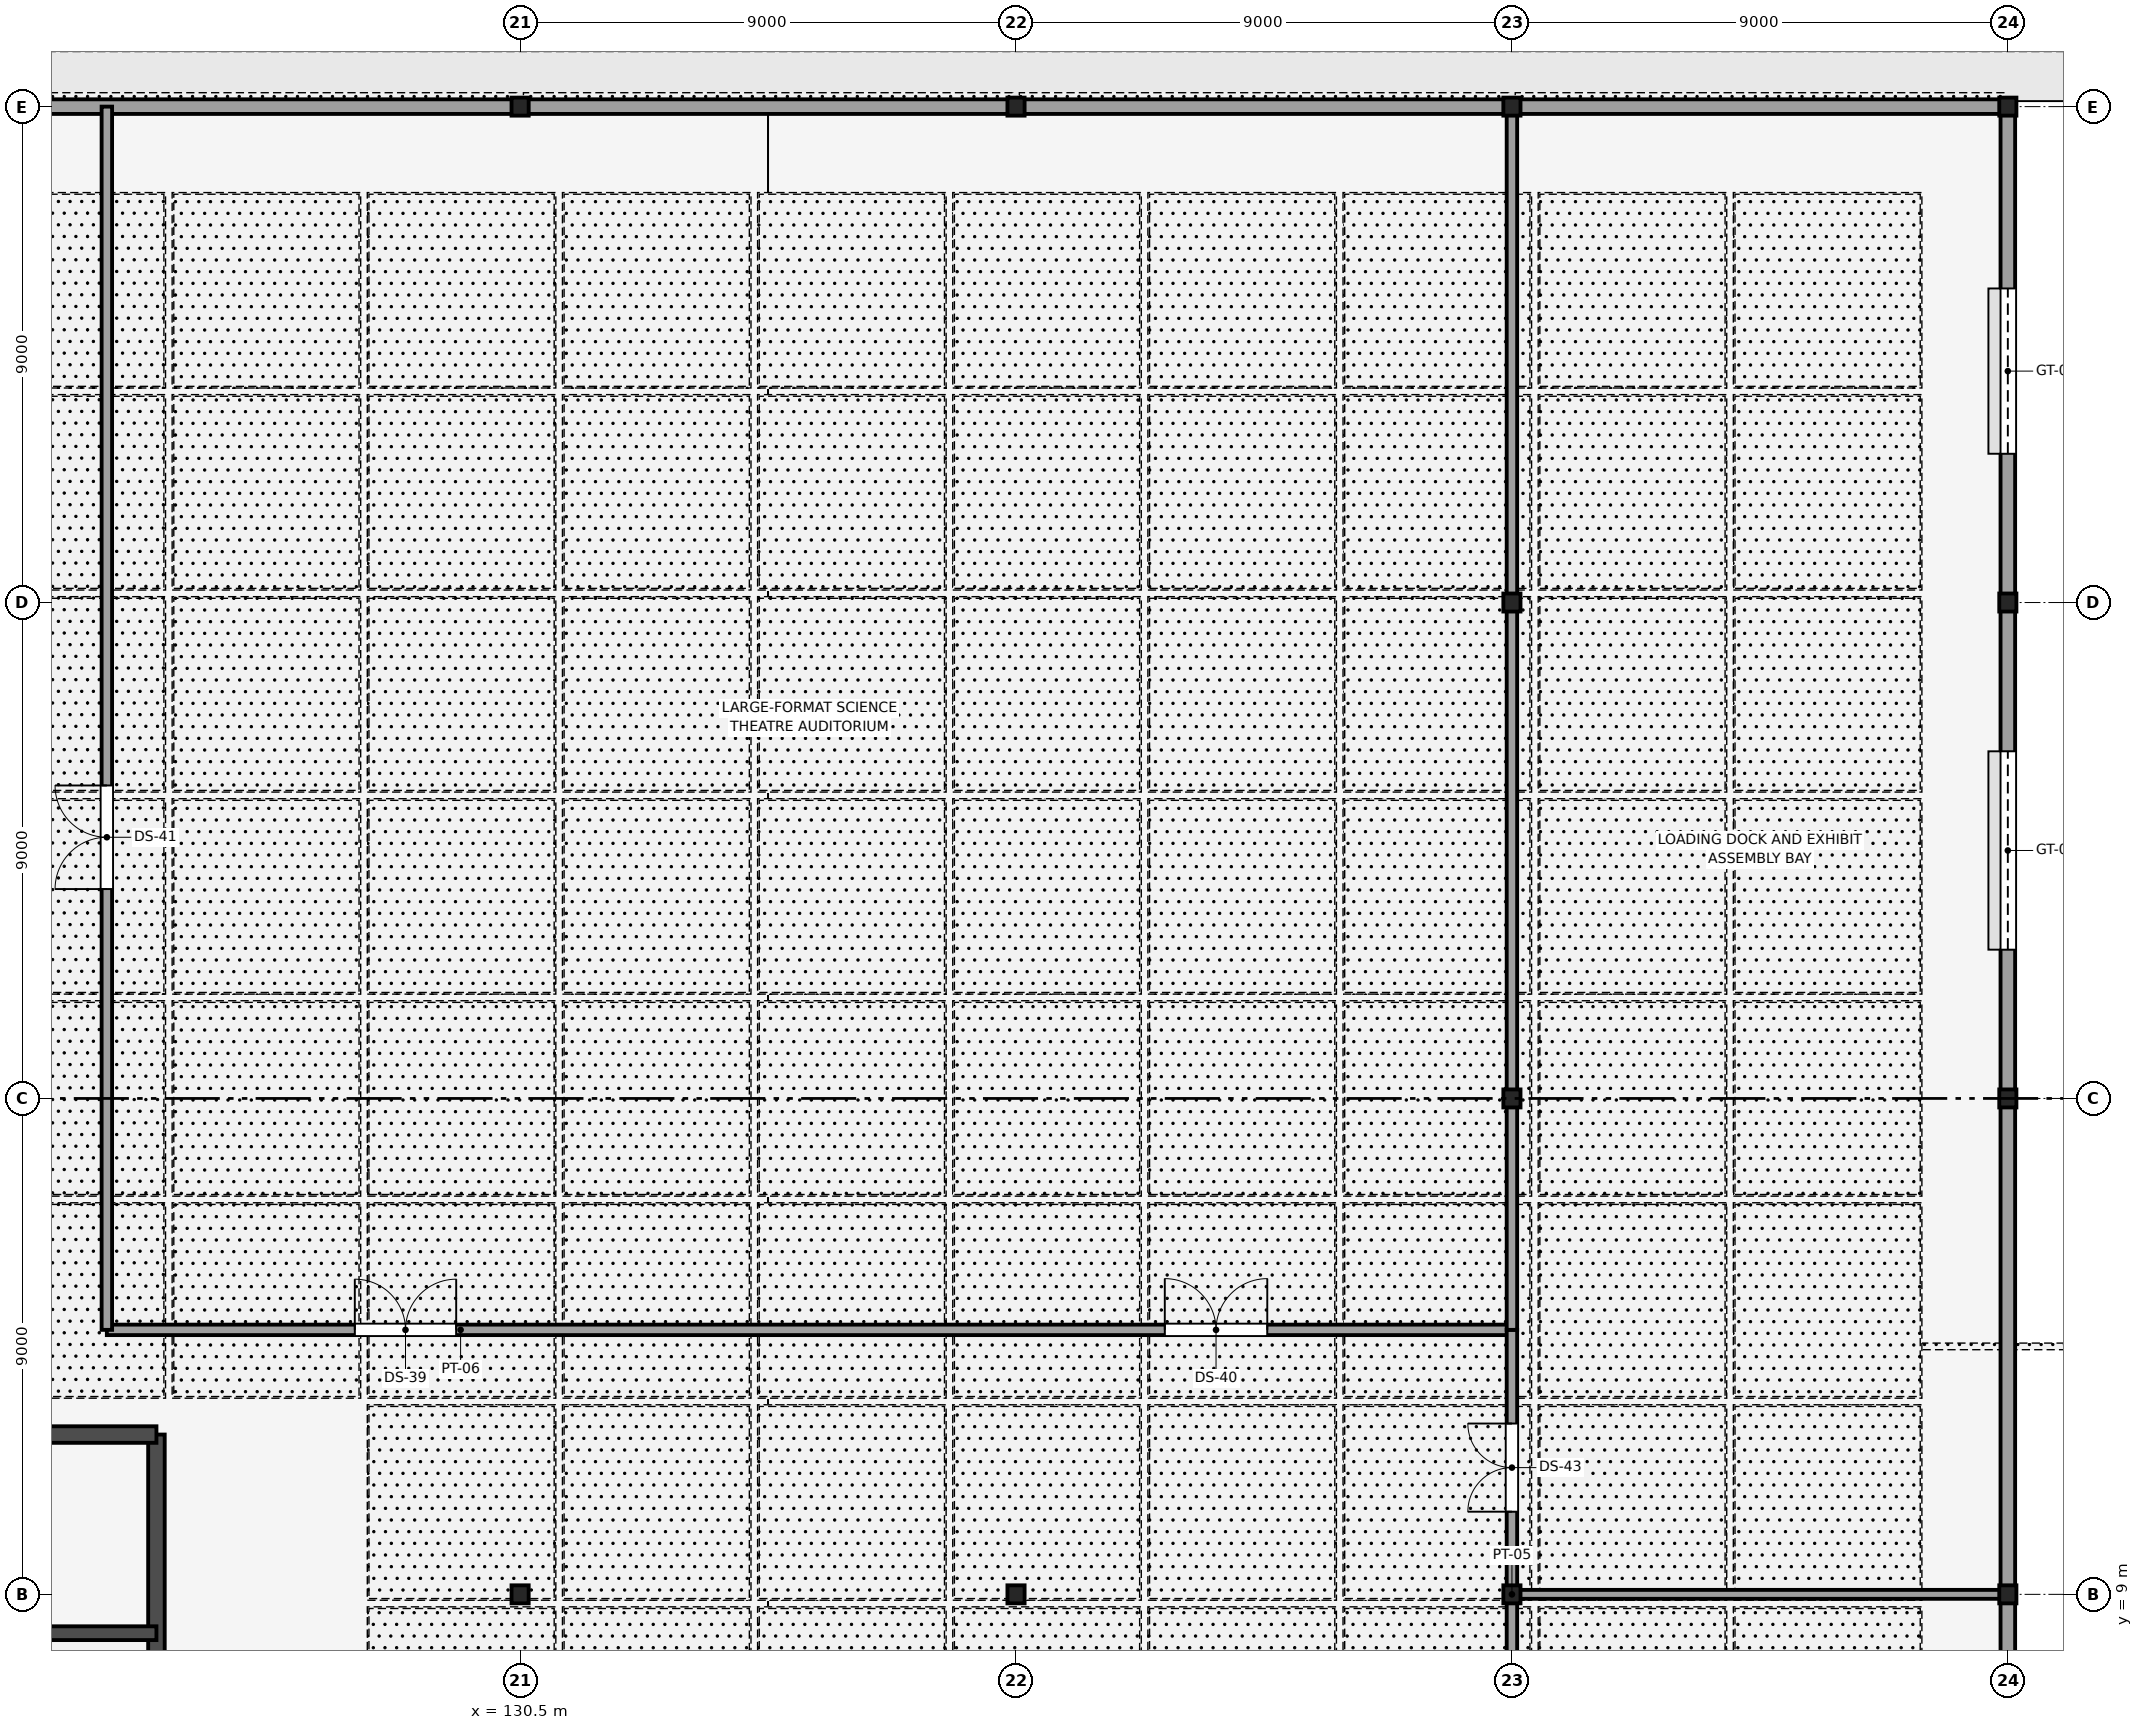
"""IFC4 building model, lengths in metres.
Left out: names, types, materials, properties, quantities, classifications, styles, units other than length and angle.
Written with IfcOpenShell. Run it as: python <this file> out.ifc"""

import sys

from ifc_helpers import new_model, si_unit, direction, frame, frame_2d, origin, origin_2d, place, context, subcontext, project, spatial, rectangle, i_section, extrude, element, fill, save


model = new_model("IFC4")
c1 = context("Model", 3, precision=1e-05, world=origin(), true_north=direction((0.0, 1.0)))
c2 = subcontext(c1, "Body", "Model", "MODEL_VIEW")
j1 = project(units=[si_unit("LENGTHUNIT", "METRE"), si_unit("PLANEANGLEUNIT", "RADIAN")], contexts=[c1])
p1 = place(None, origin())
s1 = spatial("IfcSite", under=j1, at=p1, CompositionType="ELEMENT")
p2 = place(p1, origin())
s2 = spatial("IfcBuilding", under=s1, at=p2, CompositionType="ELEMENT")
p3 = place(p2, origin())
s3 = spatial("IfcBuildingStorey", under=s2, at=p3, CompositionType="ELEMENT", Elevation=0.0)
for number, where, z_axis, x_axis in (
    (1, (130.5, 9.0, -0.24), (0.0, 0.0, 1.0), (1.0, 0.0, 0.0)),
    (2, (130.5, 36.0, -0.24), (0.0, 0.0, 1.0), (1.0, 0.0, 0.0)),
    (3, (139.5, 9.0, -0.24), (0.0, 0.0, 1.0), (1.0, 0.0, 0.0)),
    (4, (139.5, 36.0, -0.24), (0.0, 0.0, 1.0), (1.0, 0.0, 0.0)),
    (5, (148.5, 9.0, -0.24), (0.0, 0.0, 1.0), (1.0, 0.0, 0.0)),
    (6, (148.5, 18.0, -0.24), (0.0, 0.0, 1.0), (1.0, 0.0, 0.0)),
    (7, (148.5, 27.0, -0.24), (0.0, 0.0, 1.0), (1.0, 0.0, 0.0)),
    (8, (148.5, 36.0, -0.24), (0.0, 0.0, 1.0), (1.0, 0.0, 0.0)),
    (9, (157.5, 9.0, -0.24), (0.0, 0.0, 1.0), (1.0, 0.0, 0.0)),
    (10, (157.5, 18.0, -0.24), (0.0, 0.0, 1.0), (1.0, 0.0, 0.0)),
    (11, (157.5, 27.0, -0.24), (0.0, 0.0, 1.0), (1.0, 0.0, 0.0)),
    (12, (157.5, 36.0, -0.24), (0.0, 0.0, 1.0), (1.0, 0.0, 0.0)),
):
    element("IfcColumn", number, at=place(p3, frame(where, z_axis=z_axis, x_axis=x_axis)), inside=s3, PredefinedType="COLUMN", context=c2, shape_type="SweptSolid", body=[
        extrude(i_section(OverallWidth=0.311, OverallDepth=0.327, WebThickness=0.016, FlangeThickness=0.025, FilletRadius=0.017, at=origin_2d()), origin(), (0.0, 0.0, 1.0), 5.64),
    ])
p4 = place(p3, frame((123.9, 4.3, -0.24), z_axis=(0.0, 0.0, 1.0), x_axis=(0.0, 1.0, 0.0)))
e13 = element("IfcWall", 13, at=p4, inside=s3, PredefinedType="SHEAR", context=c2, shape_type="SweptSolid", body=[
    extrude(rectangle(XDim=7.6, YDim=0.3, at=frame_2d((3.8, 0.0))), origin(), (0.0, 0.0, 1.0), 5.64),
])
p5 = place(p3, frame((116.3, 11.9, -0.24), z_axis=(0.0, 0.0, 1.0), x_axis=(1.0, 0.0, 0.0)))
e14 = element("IfcWall", 14, at=p5, inside=s3, PredefinedType="SHEAR", context=c2, shape_type="SweptSolid", body=[
    extrude(rectangle(XDim=7.6, YDim=0.3, at=frame_2d((3.8, 0.0))), origin(), (0.0, 0.0, 1.0), 5.64),
])
p6 = place(p5, frame((2.7, 0.0, 0.24)))
e15 = element("IfcOpeningElement", 15, at=p6, cuts=e14, PredefinedType="OPENING", context=c2, shape_type="SweptSolid", body=[
    extrude(rectangle(XDim=1.1, YDim=2.2, at=frame_2d((0.55, 1.1))), frame((0.0, 0.16, 0.0), z_axis=(0.0, -1.0, 0.0), x_axis=(1.0, 0.0, 0.0)), (0.0, 0.0, 1.0), 0.32),
])
p7 = place(p3, frame((116.3, 8.295, -0.24), z_axis=(0.0, 0.0, 1.0), x_axis=(1.0, 0.0, 0.0)))
e16 = element("IfcWall", 16, at=p7, inside=s3, PredefinedType="SHEAR", context=c2, shape_type="SweptSolid", body=[
    extrude(rectangle(XDim=7.6, YDim=0.25, at=frame_2d((3.8, 0.0))), origin(), (0.0, 0.0, 1.0), 5.64),
])
for number, where, z_axis, x_axis in (
    (17, (130.5, 36.0, 0.0), (0.0, 0.0, 1.0), (-1.0, 0.0, 0.0)),
    (18, (139.5, 36.0, 0.0), (0.0, 0.0, 1.0), (-1.0, 0.0, 0.0)),
    (19, (148.5, 36.0, 0.0), (0.0, 0.0, 1.0), (-1.0, 0.0, 0.0)),
    (20, (157.5, 36.0, 0.0), (0.0, 0.0, 1.0), (-1.0, 0.0, 0.0)),
    (21, (157.5, 0.0, 0.0), (0.0, 0.0, 1.0), (0.0, 1.0, 0.0)),
    (22, (157.5, 9.0, 0.0), (0.0, 0.0, 1.0), (0.0, 1.0, 0.0)),
):
    element("IfcWall", number, at=place(p3, frame(where, z_axis=z_axis, x_axis=x_axis)), inside=s3, PredefinedType="STANDARD", context=c2, shape_type="SweptSolid", body=[
        extrude(rectangle(XDim=9.0, YDim=0.265, at=frame_2d((4.5, 0.0))), origin(), (0.0, 0.0, 1.0), 4.681),
    ])
p8 = place(p3, frame((157.5, 18.0, 0.0), z_axis=(0.0, 0.0, 1.0), x_axis=(0.0, 1.0, 0.0)))
e23 = element("IfcWall", 23, at=p8, inside=s3, PredefinedType="STANDARD", context=c2, shape_type="SweptSolid", body=[
    extrude(rectangle(XDim=9.0, YDim=0.265, at=frame_2d((4.5, 0.0))), origin(), (0.0, 0.0, 1.0), 4.681),
])
p9 = place(p8, frame((2.7, 0.0, 0.0)))
e24 = element("IfcOpeningElement", 24, at=p9, cuts=e23, PredefinedType="OPENING", context=c2, shape_type="SweptSolid", body=[
    extrude(rectangle(XDim=3.6, YDim=3.8, at=frame_2d((1.8, 1.9))), frame((0.0, 0.143, 0.0), z_axis=(0.0, -1.0, 0.0), x_axis=(1.0, 0.0, 0.0)), (0.0, 0.0, 1.0), 0.285),
])
p10 = place(p3, frame((157.5, 27.0, 0.0), z_axis=(0.0, 0.0, 1.0), x_axis=(0.0, 1.0, 0.0)))
e25 = element("IfcWall", 25, at=p10, inside=s3, PredefinedType="STANDARD", context=c2, shape_type="SweptSolid", body=[
    extrude(rectangle(XDim=9.0, YDim=0.265, at=frame_2d((4.5, 0.0))), origin(), (0.0, 0.0, 1.0), 4.681),
])
p11 = place(p10, frame((2.7, 0.0, 0.0)))
e26 = element("IfcOpeningElement", 26, at=p11, cuts=e25, PredefinedType="OPENING", context=c2, shape_type="SweptSolid", body=[
    extrude(rectangle(XDim=3.0, YDim=3.2, at=frame_2d((1.5, 1.6))), frame((0.0, 0.143, 0.0), z_axis=(0.0, -1.0, 0.0), x_axis=(1.0, 0.0, 0.0)), (0.0, 0.0, 1.0), 0.285),
])
p12 = place(p3, frame((123.0, 13.8, 0.0), z_axis=(0.0, 0.0, 1.0), x_axis=(1.0, 0.0, 0.0)))
e27 = element("IfcWall", 27, at=p12, inside=s3, PredefinedType="PARTITIONING", context=c2, shape_type="SweptSolid", body=[
    extrude(rectangle(XDim=25.5, YDim=0.19, at=frame_2d((12.75, 0.0))), origin(), (0.0, 0.0, 1.0), 5.22),
])
p13 = place(p12, frame((4.5, 0.0, 0.0)))
e28 = element("IfcOpeningElement", 28, at=p13, cuts=e27, PredefinedType="OPENING", context=c2, shape_type="SweptSolid", body=[
    extrude(rectangle(XDim=1.84, YDim=2.4, at=frame_2d((0.92, 1.2))), frame((0.0, 0.105, 0.0), z_axis=(0.0, -1.0, 0.0), x_axis=(1.0, 0.0, 0.0)), (0.0, 0.0, 1.0), 0.21),
])
p14 = place(p12, frame((19.2, 0.0, 0.0)))
e29 = element("IfcOpeningElement", 29, at=p14, cuts=e27, PredefinedType="OPENING", context=c2, shape_type="SweptSolid", body=[
    extrude(rectangle(XDim=1.86, YDim=2.4, at=frame_2d((0.93, 1.2))), frame((0.0, 0.105, 0.0), z_axis=(0.0, -1.0, 0.0), x_axis=(1.0, 0.0, 0.0)), (0.0, 0.0, 1.0), 0.21),
])
p15 = place(p3, frame((123.0, 13.8, 0.0), z_axis=(0.0, 0.0, 1.0), x_axis=(0.0, 1.0, 0.0)))
e30 = element("IfcWall", 30, at=p15, inside=s3, PredefinedType="PARTITIONING", context=c2, shape_type="SweptSolid", body=[
    extrude(rectangle(XDim=22.2, YDim=0.19, at=frame_2d((11.1, 0.0))), origin(), (0.0, 0.0, 1.0), 5.22),
])
p16 = place(p15, frame((8.0, 0.0, 0.0)))
e31 = element("IfcOpeningElement", 31, at=p16, cuts=e30, PredefinedType="OPENING", context=c2, shape_type="SweptSolid", body=[
    extrude(rectangle(XDim=1.88, YDim=2.4, at=frame_2d((0.94, 1.2))), frame((0.0, 0.105, 0.0), z_axis=(0.0, -1.0, 0.0), x_axis=(1.0, 0.0, 0.0)), (0.0, 0.0, 1.0), 0.21),
])
p17 = place(p3, frame((148.5, 0.0, 0.0), z_axis=(0.0, 0.0, 1.0), x_axis=(0.0, 1.0, 0.0)))
e32 = element("IfcWall", 32, at=p17, inside=s3, PredefinedType="PARTITIONING", context=c2, shape_type="SweptSolid", body=[
    extrude(rectangle(XDim=9.0, YDim=0.19, at=frame_2d((4.5, 0.0))), origin(), (0.0, 0.0, 1.0), 4.681),
])
p18 = place(p17, frame((3.8, 0.0, 0.0)))
e33 = element("IfcOpeningElement", 33, at=p18, cuts=e32, PredefinedType="OPENING", context=c2, shape_type="SweptSolid", body=[
    extrude(rectangle(XDim=0.93, YDim=2.275, at=frame_2d((0.465, 1.137))), frame((0.0, 0.105, 0.0), z_axis=(0.0, -1.0, 0.0), x_axis=(1.0, 0.0, 0.0)), (0.0, 0.0, 1.0), 0.21),
])
p19 = place(p3, frame((148.5, 9.0, 0.0), z_axis=(0.0, 0.0, 1.0), x_axis=(0.0, 1.0, 0.0)))
e34 = element("IfcWall", 34, at=p19, inside=s3, PredefinedType="PARTITIONING", context=c2, shape_type="SweptSolid", body=[
    extrude(rectangle(XDim=4.8, YDim=0.19, at=frame_2d((2.4, 0.0))), origin(), (0.0, 0.0, 1.0), 4.681),
])
p20 = place(p19, frame((1.5, 0.0, 0.0)))
e35 = element("IfcOpeningElement", 35, at=p20, cuts=e34, PredefinedType="OPENING", context=c2, shape_type="SweptSolid", body=[
    extrude(rectangle(XDim=1.6, YDim=2.325, at=frame_2d((0.8, 1.163))), frame((0.0, 0.105, 0.0), z_axis=(0.0, -1.0, 0.0), x_axis=(1.0, 0.0, 0.0)), (0.0, 0.0, 1.0), 0.21),
])
p21 = place(p3, frame((148.5, 13.8, 0.0), z_axis=(0.0, 0.0, 1.0), x_axis=(0.0, 1.0, 0.0)))
e36 = element("IfcWall", 36, at=p21, inside=s3, PredefinedType="PARTITIONING", context=c2, shape_type="SweptSolid", body=[
    extrude(rectangle(XDim=22.2, YDim=0.19, at=frame_2d((11.1, 0.0))), origin(), (0.0, 0.0, 1.0), 4.681),
])
p22 = place(p3, frame((148.5, 9.0, 0.0), z_axis=(0.0, 0.0, 1.0), x_axis=(1.0, 0.0, 0.0)))
e37 = element("IfcWall", 37, at=p22, inside=s3, PredefinedType="PARTITIONING", context=c2, shape_type="SweptSolid", body=[
    extrude(rectangle(XDim=9.0, YDim=0.162, at=frame_2d((4.5, 0.0))), origin(), (0.0, 0.0, 1.0), 4.602),
])
p23 = place(p9, origin())
e38 = element("IfcDoor", 38, at=p23, inside=s3, OperationType="ROLLINGUP", PredefinedType="GATE", context=c2, shape_type="SweptSolid", body=[
    extrude(rectangle(XDim=3.6, YDim=3.8, at=frame_2d((1.8, 1.9))), frame((0.0, 0.025, 0.0), z_axis=(0.0, -1.0, 0.0), x_axis=(1.0, 0.0, 0.0)), (0.0, 0.0, 1.0), 0.05),
])
fill(e24, e38)
p24 = place(p11, origin())
e39 = element("IfcDoor", 39, at=p24, inside=s3, OperationType="ROLLINGUP", PredefinedType="GATE", context=c2, shape_type="SweptSolid", body=[
    extrude(rectangle(XDim=3.0, YDim=3.2, at=frame_2d((1.5, 1.6))), frame((0.0, 0.025, 0.0), z_axis=(0.0, -1.0, 0.0), x_axis=(1.0, 0.0, 0.0)), (0.0, 0.0, 1.0), 0.05),
])
fill(e26, e39)
p25 = place(p13, origin())
e40 = element("IfcDoor", 40, at=p25, inside=s3, OperationType="DOUBLE_DOOR_SINGLE_SWING", PredefinedType="DOOR", context=c2, shape_type="SweptSolid", body=[
    extrude(rectangle(XDim=1.84, YDim=2.4, at=frame_2d((0.92, 1.2))), frame((0.0, 0.025, 0.0), z_axis=(0.0, -1.0, 0.0), x_axis=(1.0, 0.0, 0.0)), (0.0, 0.0, 1.0), 0.05),
])
fill(e28, e40)
p26 = place(p14, origin())
e41 = element("IfcDoor", 41, at=p26, inside=s3, OperationType="DOUBLE_DOOR_SINGLE_SWING", PredefinedType="DOOR", context=c2, shape_type="SweptSolid", body=[
    extrude(rectangle(XDim=1.86, YDim=2.4, at=frame_2d((0.93, 1.2))), frame((0.0, 0.025, 0.0), z_axis=(0.0, -1.0, 0.0), x_axis=(1.0, 0.0, 0.0)), (0.0, 0.0, 1.0), 0.05),
])
fill(e29, e41)
p27 = place(p16, origin())
e42 = element("IfcDoor", 42, at=p27, inside=s3, OperationType="DOUBLE_DOOR_SINGLE_SWING", PredefinedType="DOOR", context=c2, shape_type="SweptSolid", body=[
    extrude(rectangle(XDim=1.88, YDim=2.4, at=frame_2d((0.94, 1.2))), frame((0.0, 0.025, 0.0), z_axis=(0.0, -1.0, 0.0), x_axis=(1.0, 0.0, 0.0)), (0.0, 0.0, 1.0), 0.05),
])
fill(e31, e42)
p28 = place(p20, origin())
e43 = element("IfcDoor", 43, at=p28, inside=s3, OperationType="DOUBLE_DOOR_SINGLE_SWING", PredefinedType="DOOR", context=c2, shape_type="SweptSolid", body=[
    extrude(rectangle(XDim=1.6, YDim=2.325, at=frame_2d((0.8, 1.163))), frame((0.0, 0.025, 0.0), z_axis=(0.0, -1.0, 0.0), x_axis=(1.0, 0.0, 0.0)), (0.0, 0.0, 1.0), 0.05),
])
fill(e35, e43)
save(model, sys.argv[1])
